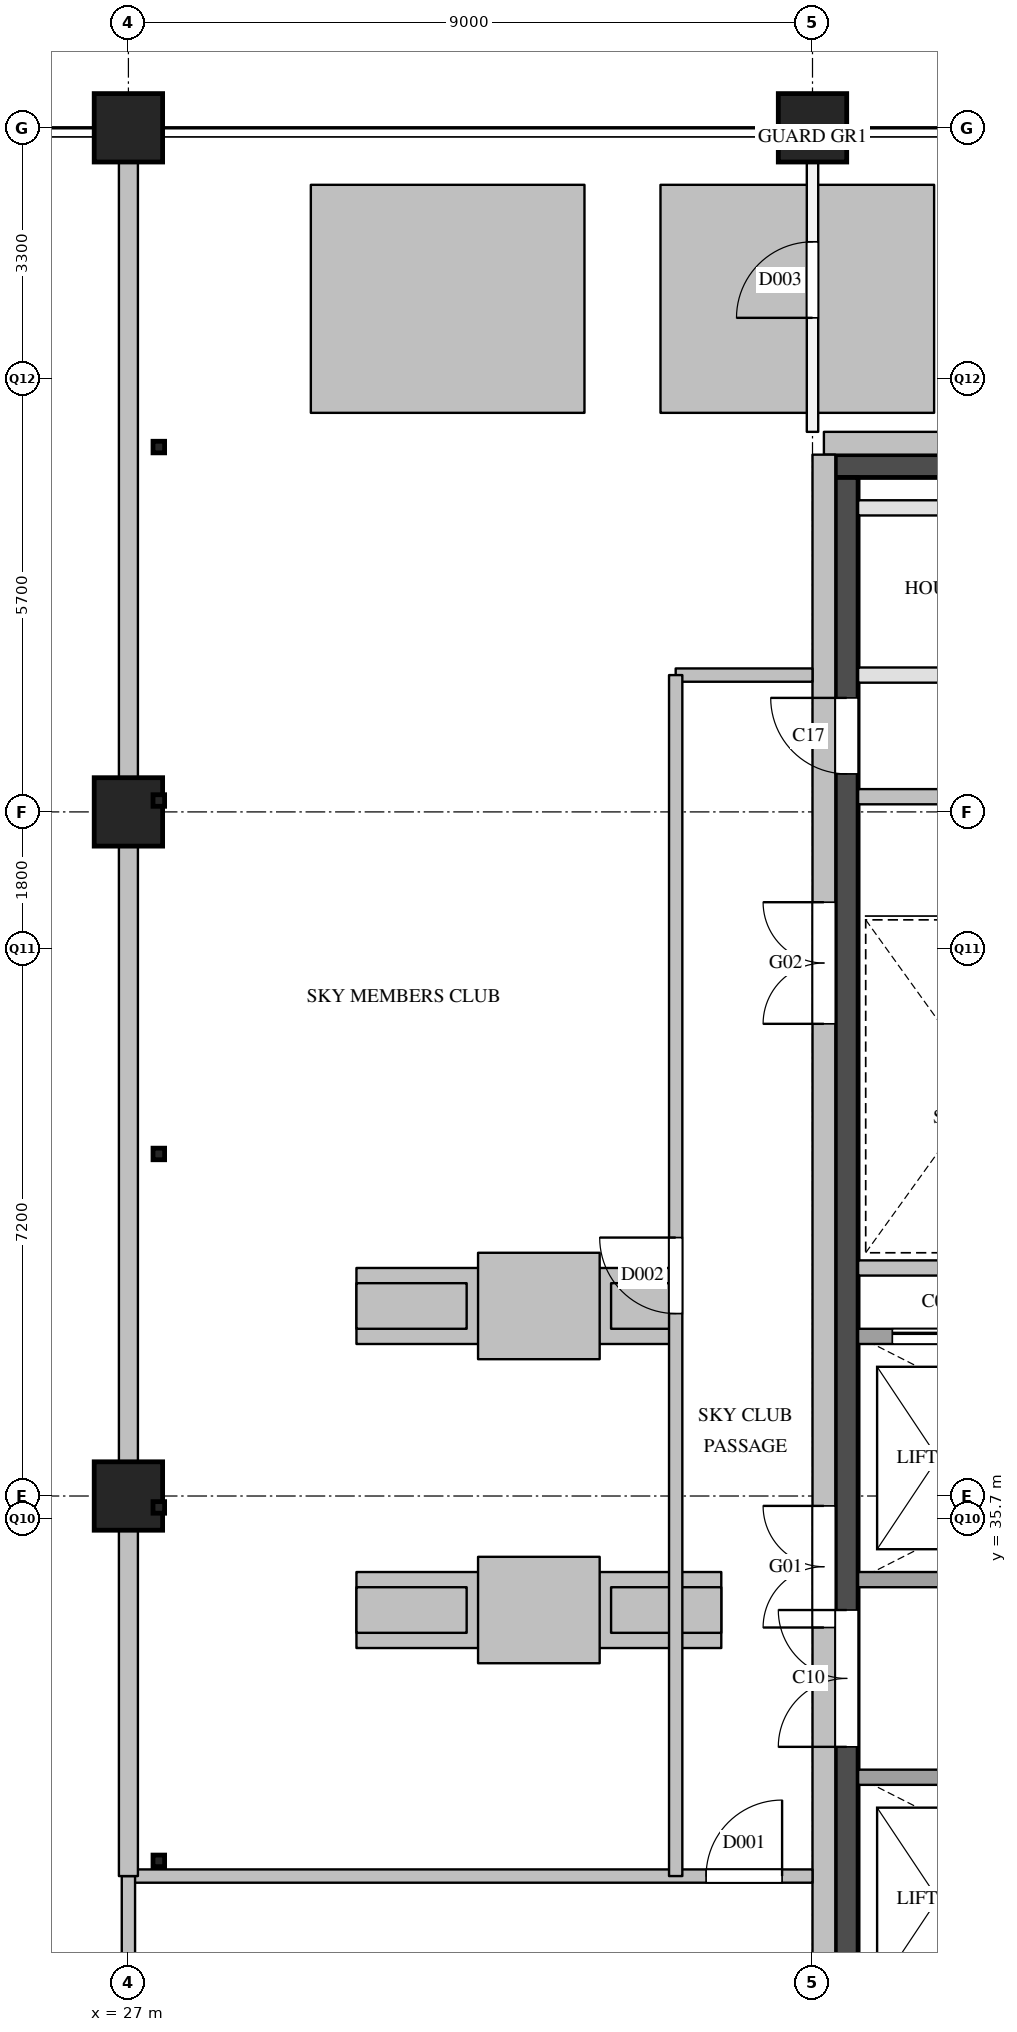
"""IFC4 building model, lengths in metres.
Left out: names, types, materials, properties, quantities, classifications, styles, units other than length and angle.
Written with IfcOpenShell. Run it as: python <this file> out.ifc"""

import sys

from ifc_helpers import new_model, si_unit, direction, frame, frame_2d, origin, origin_2d, place, context, subcontext, project, spatial, rectangle, hollow_rectangle, extrude, element, fill, save


model = new_model("IFC4")
c1 = context("Model", 3, precision=1e-05, world=origin(), true_north=direction((0.0, 1.0)))
c2 = subcontext(c1, "Body", "Model", "MODEL_VIEW")
j1 = project(units=[si_unit("LENGTHUNIT", "METRE"), si_unit("PLANEANGLEUNIT", "RADIAN")], contexts=[c1])
p1 = place(None, origin())
s1 = spatial("IfcSite", under=j1, at=p1, CompositionType="ELEMENT")
p2 = place(p1, origin())
s2 = spatial("IfcBuilding", under=s1, at=p2, CompositionType="ELEMENT")
p3 = place(p2, frame((0.0, 0.0, 320.7)))
s3 = spatial("IfcBuildingStorey", under=s2, at=p3, CompositionType="ELEMENT", Elevation=320.7)
for number, where, z_axis, x_axis in (
    (1, (27.0, 36.0, 0.0), (0.0, 0.0, 1.0), (1.0, 0.0, 0.0)),
    (2, (27.0, 45.0, 0.0), (0.0, 0.0, 1.0), (1.0, 0.0, 0.0)),
    (3, (27.0, 54.0, 0.0), (0.0, 0.0, 1.0), (1.0, 0.0, 0.0)),
    (4, (36.0, 54.0, 0.0), (0.0, 0.0, 1.0), (1.0, 0.0, 0.0)),
):
    element("IfcColumn", number, at=place(p3, frame(where, z_axis=z_axis, x_axis=x_axis)), inside=s3, PredefinedType="COLUMN", context=c2, shape_type="SweptSolid", body=[
        extrude(rectangle(XDim=0.9, YDim=0.9, at=origin_2d()), origin(), (0.0, 0.0, 1.0), 4.5),
    ])
p4 = place(p3, frame((30.0, 34.5, 4.5), z_axis=(0.0, 0.0, 1.0), x_axis=(1.0, 0.0, 0.0)))
e5 = element("IfcWall", 5, at=p4, inside=s3, PredefinedType="SOLIDWALL", context=c2, shape_type="SweptSolid", body=[
    extrude(rectangle(XDim=4.8, YDim=1.0, at=frame_2d((2.4, 0.0))), origin(), (0.0, 0.0, 1.0), 0.75),
])
p5 = place(p3, frame((30.0, 38.5, 4.5), z_axis=(0.0, 0.0, 1.0), x_axis=(1.0, 0.0, 0.0)))
e6 = element("IfcWall", 6, at=p5, inside=s3, PredefinedType="SOLIDWALL", context=c2, shape_type="SweptSolid", body=[
    extrude(rectangle(XDim=4.175, YDim=1.0, at=frame_2d((2.087, 0.0))), origin(), (0.0, 0.0, 1.0), 1.05),
])
for number, where, z_axis, x_axis in (
    (7, (29.4, 51.75, 5.1), (0.0, 0.0, 1.0), (1.0, 0.0, 0.0)),
    (8, (34.0, 51.75, 5.1), (0.0, 0.0, 1.0), (1.0, 0.0, 0.0)),
):
    element("IfcWall", number, at=place(p3, frame(where, z_axis=z_axis, x_axis=x_axis)), inside=s3, PredefinedType="SOLIDWALL", context=c2, shape_type="SweptSolid", body=[
        extrude(rectangle(XDim=3.6, YDim=3.0, at=frame_2d((1.8, 0.0))), origin(), (0.0, 0.0, 1.0), 2.6),
    ])
p6 = place(p3, frame((36.15, 49.85, 4.5), z_axis=(0.0, 0.0, 1.0), x_axis=(1.0, 0.0, 0.0)))
e9 = element("IfcWall", 9, at=p6, inside=s3, PredefinedType="SOLIDWALL", context=c2, shape_type="SweptSolid", body=[
    extrude(rectangle(XDim=12.1, YDim=0.3, at=frame_2d((6.05, 0.0))), origin(), (0.0, 0.0, 1.0), 3.6),
])
p7 = place(p3, frame((36.15, 28.8, 4.5), z_axis=(0.0, 0.0, 1.0), x_axis=(0.0, 1.0, 0.0)))
e10 = element("IfcWall", 10, at=p7, inside=s3, PredefinedType="SOLIDWALL", context=c2, shape_type="SweptSolid", body=[
    extrude(rectangle(XDim=20.9, YDim=0.3, at=frame_2d((10.45, 0.0))), origin(), (0.0, 0.0, 1.0), 3.6),
])
p8 = place(p7, frame((5.47, 0.0, 0.0)))
e11 = element("IfcOpeningElement", 11, at=p8, cuts=e10, PredefinedType="OPENING", context=c2, shape_type="SweptSolid", body=[
    extrude(rectangle(XDim=1.6, YDim=2.4, at=frame_2d((0.8, 1.2))), frame((0.0, 0.16, 0.0), z_axis=(0.0, -1.0, 0.0), x_axis=(1.0, 0.0, 0.0)), (0.0, 0.0, 1.0), 0.32),
])
p9 = place(p7, frame((13.412, 0.0, 0.0)))
e12 = element("IfcOpeningElement", 12, at=p9, cuts=e10, PredefinedType="OPENING", context=c2, shape_type="SweptSolid", body=[
    extrude(rectangle(XDim=1.6, YDim=2.4, at=frame_2d((0.8, 1.2))), frame((0.0, 0.16, 0.0), z_axis=(0.0, -1.0, 0.0), x_axis=(1.0, 0.0, 0.0)), (0.0, 0.0, 1.0), 0.32),
])
for number, where, z_axis, x_axis in (
    (13, (30.0, 34.5, 5.25), (0.0, 0.0, 1.0), (1.0, 0.0, 0.0)),
    (14, (33.35, 34.5, 5.25), (0.0, 0.0, 1.0), (1.0, 0.0, 0.0)),
    (15, (30.0, 38.5, 5.55), (0.0, 0.0, 1.0), (1.0, 0.0, 0.0)),
):
    element("IfcWall", number, at=place(p3, frame(where, z_axis=z_axis, x_axis=x_axis)), inside=s3, PredefinedType="SOLIDWALL", context=c2, shape_type="SweptSolid", body=[
        extrude(rectangle(XDim=1.45, YDim=0.6, at=frame_2d((0.725, 0.0))), origin(), (0.0, 0.0, 1.0), 0.75),
    ])
p10 = place(p3, frame((33.35, 38.5, 5.55), z_axis=(0.0, 0.0, 1.0), x_axis=(1.0, 0.0, 0.0)))
e16 = element("IfcWall", 16, at=p10, inside=s3, PredefinedType="SOLIDWALL", context=c2, shape_type="SweptSolid", body=[
    extrude(rectangle(XDim=0.824, YDim=0.6, at=frame_2d((0.412, 0.0))), origin(), (0.0, 0.0, 1.0), 0.75),
])
for number, where, z_axis, x_axis in (
    (17, (31.6, 34.5, 5.25), (0.0, 0.0, 1.0), (1.0, 0.0, 0.0)),
    (18, (31.6, 38.5, 5.55), (0.0, 0.0, 1.0), (1.0, 0.0, 0.0)),
):
    element("IfcWall", number, at=place(p3, frame(where, z_axis=z_axis, x_axis=x_axis)), inside=s3, PredefinedType="SOLIDWALL", context=c2, shape_type="SweptSolid", body=[
        extrude(rectangle(XDim=1.6, YDim=1.4, at=frame_2d((0.8, 0.0))), origin(), (0.0, 0.0, 1.0), 4.2),
    ])
for number, where, z_axis, x_axis in (
    (19, (27.4, 31.2, 4.5), (0.0, 0.0, 1.0), (1.0, 0.0, 0.0)),
    (20, (27.4, 35.85, 4.5), (0.0, 0.0, 1.0), (1.0, 0.0, 0.0)),
    (21, (27.4, 40.5, 4.5), (0.0, 0.0, 1.0), (1.0, 0.0, 0.0)),
    (22, (27.4, 45.15, 4.5), (0.0, 0.0, 1.0), (1.0, 0.0, 0.0)),
    (23, (27.4, 49.8, 4.5), (0.0, 0.0, 1.0), (1.0, 0.0, 0.0)),
):
    element("IfcColumn", number, at=place(p3, frame(where, z_axis=z_axis, x_axis=x_axis)), inside=s3, PredefinedType="COLUMN", context=c2, shape_type="SweptSolid", body=[
        extrude(hollow_rectangle(XDim=0.152, YDim=0.152, WallThickness=0.006, at=origin_2d()), origin(), (0.0, 0.0, 1.0), 3.4),
    ])
p11 = place(p3, frame((36.3, 49.55, 0.0), z_axis=(0.0, 0.0, 1.0), x_axis=(1.0, 0.0, 0.0)))
e24 = element("IfcWall", 24, at=p11, inside=s3, PredefinedType="SHEAR", context=c2, shape_type="SweptSolid", body=[
    extrude(rectangle(XDim=11.8, YDim=0.3, at=frame_2d((5.9, 0.0))), origin(), (0.0, 0.0, 1.0), 3.95),
])
p12 = place(p3, frame((36.45, 29.1, 0.0), z_axis=(0.0, 0.0, 1.0), x_axis=(0.0, 1.0, 0.0)))
e25 = element("IfcWall", 25, at=p12, inside=s3, PredefinedType="SHEAR", context=c2, shape_type="SweptSolid", body=[
    extrude(rectangle(XDim=20.3, YDim=0.3, at=frame_2d((10.15, 0.0))), origin(), (0.0, 0.0, 1.0), 3.95),
])
p13 = place(p12, frame((3.6, 0.0, 0.0)))
e26 = element("IfcOpeningElement", 26, at=p13, cuts=e25, PredefinedType="OPENING", context=c2, shape_type="SweptSolid", body=[
    extrude(rectangle(XDim=1.8, YDim=2.1, at=frame_2d((0.9, 1.05))), frame((0.0, 0.16, 0.0), z_axis=(0.0, -1.0, 0.0), x_axis=(1.0, 0.0, 0.0)), (0.0, 0.0, 1.0), 0.32),
])
p14 = place(p12, frame((16.4, 0.0, 0.0)))
e27 = element("IfcOpeningElement", 27, at=p14, cuts=e25, PredefinedType="OPENING", context=c2, shape_type="SweptSolid", body=[
    extrude(rectangle(XDim=1.0, YDim=2.1, at=frame_2d((0.5, 1.05))), frame((0.0, 0.16, 0.0), z_axis=(0.0, -1.0, 0.0), x_axis=(1.0, 0.0, 0.0)), (0.0, 0.0, 1.0), 0.32),
])
p15 = place(p3, frame((36.6, 32.3, 0.0), z_axis=(0.0, 0.0, 1.0), x_axis=(1.0, 0.0, 0.0)))
e28 = element("IfcWall", 28, at=p15, inside=s3, PredefinedType="SOLIDWALL", context=c2, shape_type="SweptSolid", body=[
    extrude(rectangle(XDim=11.2, YDim=0.2, at=frame_2d((5.6, 0.0))), origin(), (0.0, 0.0, 1.0), 3.95),
])
p16 = place(p15, frame((7.225, 0.0, 0.0)))
e29 = element("IfcOpeningElement", 29, at=p16, cuts=e28, PredefinedType="OPENING", context=c2, shape_type="SweptSolid", body=[
    extrude(rectangle(XDim=1.2, YDim=2.1, at=frame_2d((0.6, 1.05))), frame((0.0, 0.11, 0.0), z_axis=(0.0, -1.0, 0.0), x_axis=(1.0, 0.0, 0.0)), (0.0, 0.0, 1.0), 0.22),
])
p17 = place(p15, frame((9.475, 0.0, 0.0)))
e30 = element("IfcOpeningElement", 30, at=p17, cuts=e28, PredefinedType="OPENING", context=c2, shape_type="SweptSolid", body=[
    extrude(rectangle(XDim=1.2, YDim=2.1, at=frame_2d((0.6, 1.05))), frame((0.0, 0.11, 0.0), z_axis=(0.0, -1.0, 0.0), x_axis=(1.0, 0.0, 0.0)), (0.0, 0.0, 1.0), 0.22),
])
p18 = place(p3, frame((36.6, 34.9, 0.0), z_axis=(0.0, 0.0, 1.0), x_axis=(1.0, 0.0, 0.0)))
e31 = element("IfcWall", 31, at=p18, inside=s3, PredefinedType="SOLIDWALL", context=c2, shape_type="SweptSolid", body=[
    extrude(rectangle(XDim=6.3, YDim=0.2, at=frame_2d((3.15, 0.0))), origin(), (0.0, 0.0, 1.0), 3.95),
])
p19 = place(p3, frame((36.6, 38.1, 0.0), z_axis=(0.0, 0.0, 1.0), x_axis=(1.0, 0.0, 0.0)))
e32 = element("IfcWall", 32, at=p19, inside=s3, PredefinedType="SOLIDWALL", context=c2, shape_type="SweptSolid", body=[
    extrude(rectangle(XDim=6.7, YDim=0.2, at=frame_2d((3.35, 0.0))), origin(), (0.0, 0.0, 1.0), 3.95),
])
p20 = place(p19, frame((0.45, 0.0, 0.0)))
e33 = element("IfcOpeningElement", 33, at=p20, cuts=e32, PredefinedType="OPENING", context=c2, shape_type="SweptSolid", body=[
    extrude(rectangle(XDim=1.2, YDim=2.1, at=frame_2d((0.6, 1.05))), frame((0.0, 0.11, 0.0), z_axis=(0.0, -1.0, 0.0), x_axis=(1.0, 0.0, 0.0)), (0.0, 0.0, 1.0), 0.22),
])
p21 = place(p19, frame((2.55, 0.0, 0.0)))
e34 = element("IfcOpeningElement", 34, at=p21, cuts=e32, PredefinedType="OPENING", context=c2, shape_type="SweptSolid", body=[
    extrude(rectangle(XDim=1.2, YDim=2.1, at=frame_2d((0.6, 1.05))), frame((0.0, 0.11, 0.0), z_axis=(0.0, -1.0, 0.0), x_axis=(1.0, 0.0, 0.0)), (0.0, 0.0, 1.0), 0.22),
])
p22 = place(p19, frame((4.65, 0.0, 0.0)))
e35 = element("IfcOpeningElement", 35, at=p22, cuts=e32, PredefinedType="OPENING", context=c2, shape_type="SweptSolid", body=[
    extrude(rectangle(XDim=1.2, YDim=2.1, at=frame_2d((0.6, 1.05))), frame((0.0, 0.11, 0.0), z_axis=(0.0, -1.0, 0.0), x_axis=(1.0, 0.0, 0.0)), (0.0, 0.0, 1.0), 0.22),
])
p23 = place(p3, frame((36.6, 39.0, 0.0), z_axis=(0.0, 0.0, 1.0), x_axis=(1.0, 0.0, 0.0)))
e36 = element("IfcWall", 36, at=p23, inside=s3, PredefinedType="SOLIDWALL", context=c2, shape_type="SweptSolid", body=[
    extrude(rectangle(XDim=10.05, YDim=0.2, at=frame_2d((5.025, 0.0))), origin(), (0.0, 0.0, 1.0), 3.95),
])
p24 = place(p3, frame((36.6, 45.2, 0.0), z_axis=(0.0, 0.0, 1.0), x_axis=(1.0, 0.0, 0.0)))
e37 = element("IfcWall", 37, at=p24, inside=s3, PredefinedType="SOLIDWALL", context=c2, shape_type="SweptSolid", body=[
    extrude(rectangle(XDim=10.05, YDim=0.2, at=frame_2d((5.025, 0.0))), origin(), (0.0, 0.0, 1.0), 3.95),
])
p25 = place(p24, frame((1.125, 0.0, 0.0)))
e38 = element("IfcOpeningElement", 38, at=p25, cuts=e37, PredefinedType="OPENING", context=c2, shape_type="SweptSolid", body=[
    extrude(rectangle(XDim=1.1, YDim=2.1, at=frame_2d((0.55, 1.05))), frame((0.0, 0.11, 0.0), z_axis=(0.0, -1.0, 0.0), x_axis=(1.0, 0.0, 0.0)), (0.0, 0.0, 1.0), 0.22),
])
p26 = place(p24, frame((4.475, 0.0, 0.0)))
e39 = element("IfcOpeningElement", 39, at=p26, cuts=e37, PredefinedType="OPENING", context=c2, shape_type="SweptSolid", body=[
    extrude(rectangle(XDim=1.1, YDim=2.1, at=frame_2d((0.55, 1.05))), frame((0.0, 0.11, 0.0), z_axis=(0.0, -1.0, 0.0), x_axis=(1.0, 0.0, 0.0)), (0.0, 0.0, 1.0), 0.22),
])
p27 = place(p24, frame((7.825, 0.0, 0.0)))
e40 = element("IfcOpeningElement", 40, at=p27, cuts=e37, PredefinedType="OPENING", context=c2, shape_type="SweptSolid", body=[
    extrude(rectangle(XDim=1.1, YDim=2.1, at=frame_2d((0.55, 1.05))), frame((0.0, 0.11, 0.0), z_axis=(0.0, -1.0, 0.0), x_axis=(1.0, 0.0, 0.0)), (0.0, 0.0, 1.0), 0.22),
])
p28 = place(p3, frame((36.6, 46.8, 0.0), z_axis=(0.0, 0.0, 1.0), x_axis=(1.0, 0.0, 0.0)))
e41 = element("IfcWall", 41, at=p28, inside=s3, PredefinedType="PARTITIONING", context=c2, shape_type="SweptSolid", body=[
    extrude(rectangle(XDim=11.2, YDim=0.2, at=frame_2d((5.6, 0.0))), origin(), (0.0, 0.0, 1.0), 3.95),
])
p29 = place(p28, frame((3.75, 0.0, 0.0)))
e42 = element("IfcOpeningElement", 42, at=p29, cuts=e41, PredefinedType="OPENING", context=c2, shape_type="SweptSolid", body=[
    extrude(rectangle(XDim=0.9, YDim=2.1, at=frame_2d((0.45, 1.05))), frame((0.0, 0.11, 0.0), z_axis=(0.0, -1.0, 0.0), x_axis=(1.0, 0.0, 0.0)), (0.0, 0.0, 1.0), 0.22),
])
p30 = place(p28, frame((9.35, 0.0, 0.0)))
e43 = element("IfcOpeningElement", 43, at=p30, cuts=e41, PredefinedType="OPENING", context=c2, shape_type="SweptSolid", body=[
    extrude(rectangle(XDim=0.9, YDim=2.1, at=frame_2d((0.45, 1.05))), frame((0.0, 0.11, 0.0), z_axis=(0.0, -1.0, 0.0), x_axis=(1.0, 0.0, 0.0)), (0.0, 0.0, 1.0), 0.22),
])
p31 = place(p3, frame((36.6, 49.0, 0.0), z_axis=(0.0, 0.0, 1.0), x_axis=(1.0, 0.0, 0.0)))
e44 = element("IfcWall", 44, at=p31, inside=s3, PredefinedType="PARTITIONING", context=c2, shape_type="SweptSolid", body=[
    extrude(rectangle(XDim=11.2, YDim=0.2, at=frame_2d((5.6, 0.0))), origin(), (0.0, 0.0, 1.0), 3.95),
])
p32 = place(p3, frame((27.0, 31.0, 0.0), z_axis=(0.0, 0.0, 1.0), x_axis=(1.0, 0.0, 0.0)))
e45 = element("IfcWall", 45, at=p32, inside=s3, PredefinedType="PARTITIONING", context=c2, shape_type="SweptSolid", body=[
    extrude(rectangle(XDim=9.0, YDim=0.175, at=frame_2d((4.5, 0.0))), origin(), (0.0, 0.0, 1.0), 2.95),
])
p33 = place(p32, frame((7.6, 0.0, 0.0)))
e46 = element("IfcOpeningElement", 46, at=p33, cuts=e45, PredefinedType="OPENING", context=c2, shape_type="SweptSolid", body=[
    extrude(rectangle(XDim=1.0, YDim=2.1, at=frame_2d((0.5, 1.05))), frame((0.0, 0.097, 0.0), z_axis=(0.0, -1.0, 0.0), x_axis=(1.0, 0.0, 0.0)), (0.0, 0.0, 1.0), 0.195),
])
p34 = place(p3, frame((34.2, 46.8, 0.0), z_axis=(0.0, 0.0, 1.0), x_axis=(1.0, 0.0, 0.0)))
e47 = element("IfcWall", 47, at=p34, inside=s3, PredefinedType="PARTITIONING", context=c2, shape_type="SweptSolid", body=[
    extrude(rectangle(XDim=1.8, YDim=0.175, at=frame_2d((0.9, 0.0))), origin(), (0.0, 0.0, 1.0), 3.95),
])
p35 = place(p3, frame((27.0, 27.0, 0.0), z_axis=(0.0, 0.0, 1.0), x_axis=(0.0, 1.0, 0.0)))
e48 = element("IfcWall", 48, at=p35, inside=s3, PredefinedType="PARTITIONING", context=c2, shape_type="SweptSolid", body=[
    extrude(rectangle(XDim=4.0, YDim=0.175, at=frame_2d((2.0, 0.0))), origin(), (0.0, 0.0, 1.0), 2.95),
])
p36 = place(p35, frame((1.5, 0.0, 0.0)))
e49 = element("IfcOpeningElement", 49, at=p36, cuts=e48, PredefinedType="OPENING", context=c2, shape_type="SweptSolid", body=[
    extrude(rectangle(XDim=1.0, YDim=2.1, at=frame_2d((0.5, 1.05))), frame((0.0, 0.097, 0.0), z_axis=(0.0, -1.0, 0.0), x_axis=(1.0, 0.0, 0.0)), (0.0, 0.0, 1.0), 0.195),
])
p37 = place(p3, frame((34.2, 31.0, 0.0), z_axis=(0.0, 0.0, 1.0), x_axis=(0.0, 1.0, 0.0)))
e50 = element("IfcWall", 50, at=p37, inside=s3, PredefinedType="PARTITIONING", context=c2, shape_type="SweptSolid", body=[
    extrude(rectangle(XDim=15.8, YDim=0.175, at=frame_2d((7.9, 0.0))), origin(), (0.0, 0.0, 1.0), 3.95),
])
p38 = place(p37, frame((7.4, 0.0, 0.0)))
e51 = element("IfcOpeningElement", 51, at=p38, cuts=e50, PredefinedType="OPENING", context=c2, shape_type="SweptSolid", body=[
    extrude(rectangle(XDim=1.0, YDim=2.1, at=frame_2d((0.5, 1.05))), frame((0.0, 0.097, 0.0), z_axis=(0.0, -1.0, 0.0), x_axis=(1.0, 0.0, 0.0)), (0.0, 0.0, 1.0), 0.195),
])
p39 = place(p3, frame((36.0, 50.0, 0.0), z_axis=(0.0, 0.0, 1.0), x_axis=(0.0, 1.0, 0.0)))
e52 = element("IfcWall", 52, at=p39, inside=s3, PredefinedType="PARTITIONING", context=c2, shape_type="SweptSolid", body=[
    extrude(rectangle(XDim=4.0, YDim=0.15, at=frame_2d((2.0, 0.0))), origin(), (0.0, 0.0, 1.0), 3.95),
])
p40 = place(p39, frame((1.5, 0.0, 0.0)))
e53 = element("IfcOpeningElement", 53, at=p40, cuts=e52, PredefinedType="OPENING", context=c2, shape_type="SweptSolid", body=[
    extrude(rectangle(XDim=1.0, YDim=2.1, at=frame_2d((0.5, 1.05))), frame((0.0, 0.085, 0.0), z_axis=(0.0, -1.0, 0.0), x_axis=(1.0, 0.0, 0.0)), (0.0, 0.0, 1.0), 0.17),
])
p41 = place(p3, frame((27.0, 31.0, 0.0), z_axis=(0.0, 0.0, 1.0), x_axis=(0.0, 1.0, 0.0)))
e54 = element("IfcWall", 54, at=p41, inside=s3, PredefinedType="PARTITIONING", context=c2, shape_type="SweptSolid", body=[
    extrude(rectangle(XDim=23.0, YDim=0.25, at=frame_2d((11.5, 0.0))), origin(), (0.0, 0.0, 1.0), 2.95),
])
p42 = place(p8, origin())
e55 = element("IfcDoor", 55, at=p42, inside=s3, OperationType="DOUBLE_DOOR_SINGLE_SWING", PredefinedType="DOOR", context=c2, shape_type="SweptSolid", body=[
    extrude(rectangle(XDim=1.6, YDim=2.4, at=frame_2d((0.8, 1.2))), frame((0.0, 0.025, 0.0), z_axis=(0.0, -1.0, 0.0), x_axis=(1.0, 0.0, 0.0)), (0.0, 0.0, 1.0), 0.05),
])
fill(e11, e55)
p43 = place(p9, origin())
e56 = element("IfcDoor", 56, at=p43, inside=s3, OperationType="DOUBLE_DOOR_SINGLE_SWING", PredefinedType="DOOR", context=c2, shape_type="SweptSolid", body=[
    extrude(rectangle(XDim=1.6, YDim=2.4, at=frame_2d((0.8, 1.2))), frame((0.0, 0.025, 0.0), z_axis=(0.0, -1.0, 0.0), x_axis=(1.0, 0.0, 0.0)), (0.0, 0.0, 1.0), 0.05),
])
fill(e12, e56)
p44 = place(p20, origin())
e57 = element("IfcDoor", 57, at=p44, inside=s3, OperationType="SLIDING_TO_LEFT", PredefinedType="DOOR", context=c2, shape_type="SweptSolid", body=[
    extrude(rectangle(XDim=1.2, YDim=2.1, at=frame_2d((0.6, 1.05))), frame((0.0, 0.025, 0.0), z_axis=(0.0, -1.0, 0.0), x_axis=(1.0, 0.0, 0.0)), (0.0, 0.0, 1.0), 0.05),
])
fill(e33, e57)
p45 = place(p13, origin())
e58 = element("IfcDoor", 58, at=p45, inside=s3, OperationType="DOUBLE_DOOR_SINGLE_SWING", PredefinedType="DOOR", context=c2, shape_type="SweptSolid", body=[
    extrude(rectangle(XDim=1.8, YDim=2.1, at=frame_2d((0.9, 1.05))), frame((0.0, 0.025, 0.0), z_axis=(0.0, -1.0, 0.0), x_axis=(1.0, 0.0, 0.0)), (0.0, 0.0, 1.0), 0.05),
])
fill(e26, e58)
p46 = place(p14, origin())
e59 = element("IfcDoor", 59, at=p46, inside=s3, OperationType="SINGLE_SWING_RIGHT", PredefinedType="DOOR", context=c2, shape_type="SweptSolid", body=[
    extrude(rectangle(XDim=1.0, YDim=2.1, at=frame_2d((0.5, 1.05))), frame((0.0, 0.025, 0.0), z_axis=(0.0, -1.0, 0.0), x_axis=(1.0, 0.0, 0.0)), (0.0, 0.0, 1.0), 0.05),
])
fill(e27, e59)
p47 = place(p33, origin())
e60 = element("IfcDoor", 60, at=p47, inside=s3, OperationType="SINGLE_SWING_RIGHT", PredefinedType="DOOR", context=c2, shape_type="SweptSolid", body=[
    extrude(rectangle(XDim=1.0, YDim=2.1, at=frame_2d((0.5, 1.05))), frame((0.0, 0.025, 0.0), z_axis=(0.0, -1.0, 0.0), x_axis=(1.0, 0.0, 0.0)), (0.0, 0.0, 1.0), 0.05),
])
fill(e46, e60)
p48 = place(p38, origin())
e61 = element("IfcDoor", 61, at=p48, inside=s3, OperationType="SINGLE_SWING_RIGHT", PredefinedType="DOOR", context=c2, shape_type="SweptSolid", body=[
    extrude(rectangle(XDim=1.0, YDim=2.1, at=frame_2d((0.5, 1.05))), frame((0.0, 0.025, 0.0), z_axis=(0.0, -1.0, 0.0), x_axis=(1.0, 0.0, 0.0)), (0.0, 0.0, 1.0), 0.05),
])
fill(e51, e61)
p49 = place(p40, origin())
e62 = element("IfcDoor", 62, at=p49, inside=s3, OperationType="SINGLE_SWING_LEFT", PredefinedType="DOOR", context=c2, shape_type="SweptSolid", body=[
    extrude(rectangle(XDim=1.0, YDim=2.1, at=frame_2d((0.5, 1.05))), frame((0.0, 0.025, 0.0), z_axis=(0.0, -1.0, 0.0), x_axis=(1.0, 0.0, 0.0)), (0.0, 0.0, 1.0), 0.05),
])
fill(e53, e62)
save(model, sys.argv[1])
